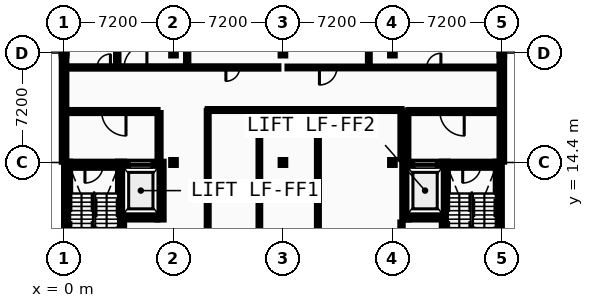
"""IFC4 building model, lengths in metres.
Left out: names, types, materials, properties, quantities, classifications, styles, units other than length and angle.
Written with IfcOpenShell. Run it as: python <this file> out.ifc"""

import sys

from ifc_helpers import new_model, si_unit, direction, frame, frame_2d, origin, origin_2d, place, context, subcontext, project, spatial, rectangle, i_section, extrude, element, fill, save


model = new_model("IFC4")
c1 = context("Model", 3, precision=1e-05, world=origin(), true_north=direction((0.0, 1.0)))
c2 = subcontext(c1, "Body", "Model", "MODEL_VIEW")
j1 = project(units=[si_unit("LENGTHUNIT", "METRE"), si_unit("PLANEANGLEUNIT", "RADIAN")], contexts=[c1])
p1 = place(None, origin())
s1 = spatial("IfcSite", under=j1, at=p1, CompositionType="ELEMENT")
p2 = place(p1, origin())
s2 = spatial("IfcBuilding", under=s1, at=p2, CompositionType="ELEMENT")
p3 = place(p2, frame((0.0, 0.0, 22.8)))
s3 = spatial("IfcBuildingStorey", under=s2, at=p3, CompositionType="ELEMENT", Elevation=22.8)
for number, where, z_axis, x_axis in (
    (1, (0.0, 21.6, 0.0), (0.0, 0.0, 1.0), (1.0, 0.0, 0.0)),
    (2, (7.2, 14.4, 0.0), (0.0, 0.0, 1.0), (1.0, 0.0, 0.0)),
    (3, (7.2, 21.6, 0.0), (0.0, 0.0, 1.0), (1.0, 0.0, 0.0)),
    (4, (14.4, 14.4, 0.0), (0.0, 0.0, 1.0), (1.0, 0.0, 0.0)),
    (5, (14.4, 21.6, 0.0), (0.0, 0.0, 1.0), (1.0, 0.0, 0.0)),
    (6, (21.6, 14.4, 0.0), (0.0, 0.0, 1.0), (1.0, 0.0, 0.0)),
    (7, (21.6, 21.6, 0.0), (0.0, 0.0, 1.0), (1.0, 0.0, 0.0)),
    (8, (28.8, 21.6, 0.0), (0.0, 0.0, 1.0), (1.0, 0.0, 0.0)),
):
    element("IfcColumn", number, at=place(p3, frame(where, z_axis=z_axis, x_axis=x_axis)), inside=s3, PredefinedType="COLUMN", context=c2, shape_type="SweptSolid", body=[
        extrude(i_section(OverallWidth=0.3, OverallDepth=0.32, WebThickness=0.011, FlangeThickness=0.021, FilletRadius=0.027, at=origin_2d()), origin(), (0.0, 0.0, 1.0), 4.4),
    ])
p4 = place(p3, frame((0.0, 21.6, 0.0), z_axis=(0.0, 0.0, 1.0), x_axis=(0.0, -1.0, 0.0)))
e9 = element("IfcWall", 9, at=p4, inside=s3, PredefinedType="STANDARD", context=c2, shape_type="SweptSolid", body=[
    extrude(rectangle(XDim=7.15, YDim=0.3, at=frame_2d((3.575, 0.0))), origin(), (0.0, 0.0, 1.0), 4.215),
])
p5 = place(p3, frame((0.0, 28.8, 0.0), z_axis=(0.0, 0.0, 1.0), x_axis=(0.0, -1.0, 0.0)))
e10 = element("IfcWall", 10, at=p5, inside=s3, PredefinedType="STANDARD", context=c2, shape_type="SweptSolid", body=[
    extrude(rectangle(XDim=7.2, YDim=0.3, at=frame_2d((3.6, 0.0))), origin(), (0.0, 0.0, 1.0), 3.9),
])
p6 = place(p5, frame((1.56, 0.0, 0.9)))
e11 = element("IfcOpeningElement", 11, at=p6, cuts=e10, PredefinedType="OPENING", context=c2, shape_type="SweptSolid", body=[
    extrude(rectangle(XDim=1.2, YDim=1.8, at=frame_2d((0.6, 0.9))), frame((0.0, 0.16, 0.0), z_axis=(0.0, -1.0, 0.0), x_axis=(1.0, 0.0, 0.0)), (0.0, 0.0, 1.0), 0.32),
])
p7 = place(p5, frame((4.44, 0.0, 0.9)))
e12 = element("IfcOpeningElement", 12, at=p7, cuts=e10, PredefinedType="OPENING", context=c2, shape_type="SweptSolid", body=[
    extrude(rectangle(XDim=1.2, YDim=1.8, at=frame_2d((0.6, 0.9))), frame((0.0, 0.16, 0.0), z_axis=(0.0, -1.0, 0.0), x_axis=(1.0, 0.0, 0.0)), (0.0, 0.0, 1.0), 0.32),
])
p8 = place(p3, frame((28.8, 14.45, 0.0), z_axis=(0.0, 0.0, 1.0), x_axis=(0.0, 1.0, 0.0)))
e13 = element("IfcWall", 13, at=p8, inside=s3, PredefinedType="STANDARD", context=c2, shape_type="SweptSolid", body=[
    extrude(rectangle(XDim=7.15, YDim=0.3, at=frame_2d((3.575, 0.0))), origin(), (0.0, 0.0, 1.0), 4.215),
])
p9 = place(p3, frame((0.4, 14.25, 0.0), z_axis=(0.0, 0.0, 1.0), x_axis=(1.0, 0.0, 0.0)))
e14 = element("IfcWall", 14, at=p9, inside=s3, PredefinedType="SHEAR", context=c2, shape_type="SweptSolid", body=[
    extrude(rectangle(XDim=3.15, YDim=0.4, at=frame_2d((1.575, 0.0))), origin(), (0.0, 0.0, 1.0), 4.215),
])
p10 = place(p9, frame((0.975, 0.0, 0.0)))
e15 = element("IfcOpeningElement", 15, at=p10, cuts=e14, PredefinedType="OPENING", context=c2, shape_type="SweptSolid", body=[
    extrude(rectangle(XDim=1.2, YDim=2.15, at=frame_2d((0.6, 1.075))), frame((0.0, 0.21, 0.0), z_axis=(0.0, -1.0, 0.0), x_axis=(1.0, 0.0, 0.0)), (0.0, 0.0, 1.0), 0.42),
])
for number, where, z_axis, x_axis in (
    (16, (0.2, 5.85, 0.0), (0.0, 0.0, 1.0), (0.0, 1.0, 0.0)),
    (17, (3.75, 5.85, 0.0), (0.0, 0.0, 1.0), (0.0, 1.0, 0.0)),
):
    element("IfcWall", number, at=place(p3, frame(where, z_axis=z_axis, x_axis=x_axis)), inside=s3, PredefinedType="SHEAR", context=c2, shape_type="SweptSolid", body=[
        extrude(rectangle(XDim=8.6, YDim=0.4, at=frame_2d((4.3, 0.0))), origin(), (0.0, 0.0, 1.0), 4.215),
    ])
p11 = place(p3, frame((3.95, 10.85, 0.0), z_axis=(0.0, 0.0, 1.0), x_axis=(1.0, 0.0, 0.0)))
e18 = element("IfcWall", 18, at=p11, inside=s3, PredefinedType="SHEAR", context=c2, shape_type="SweptSolid", body=[
    extrude(rectangle(XDim=2.2, YDim=0.4, at=frame_2d((1.1, 0.0))), origin(), (0.0, 0.0, 1.0), 4.215),
])
p12 = place(p3, frame((3.95, 14.25, 0.0), z_axis=(0.0, 0.0, 1.0), x_axis=(1.0, 0.0, 0.0)))
e19 = element("IfcWall", 19, at=p12, inside=s3, PredefinedType="SHEAR", context=c2, shape_type="SweptSolid", body=[
    extrude(rectangle(XDim=2.2, YDim=0.4, at=frame_2d((1.1, 0.0))), origin(), (0.0, 0.0, 1.0), 4.215),
])
p13 = place(p12, frame((0.4, 0.0, 0.0)))
e20 = element("IfcOpeningElement", 20, at=p13, cuts=e19, PredefinedType="OPENING", context=c2, shape_type="SweptSolid", body=[
    extrude(rectangle(XDim=1.4, YDim=2.2, at=frame_2d((0.7, 1.1))), frame((0.0, 0.21, 0.0), z_axis=(0.0, -1.0, 0.0), x_axis=(1.0, 0.0, 0.0)), (0.0, 0.0, 1.0), 0.42),
])
p14 = place(p3, frame((6.35, 10.65, 0.0), z_axis=(0.0, 0.0, 1.0), x_axis=(0.0, 1.0, 0.0)))
e21 = element("IfcWall", 21, at=p14, inside=s3, PredefinedType="SHEAR", context=c2, shape_type="SweptSolid", body=[
    extrude(rectangle(XDim=3.8, YDim=0.4, at=frame_2d((1.9, 0.0))), origin(), (0.0, 0.0, 1.0), 4.215),
])
p15 = place(p3, frame((0.4, 17.75, 0.0), z_axis=(0.0, 0.0, 1.0), x_axis=(1.0, 0.0, 0.0)))
e22 = element("IfcWall", 22, at=p15, inside=s3, PredefinedType="PARTITIONING", context=c2, shape_type="SweptSolid", body=[
    extrude(rectangle(XDim=5.75, YDim=0.2, at=frame_2d((2.875, 0.0))), origin(), (0.0, 0.0, 1.0), 4.215),
])
p16 = place(p15, frame((2.075, 0.0, 0.0)))
e23 = element("IfcOpeningElement", 23, at=p16, cuts=e22, PredefinedType="OPENING", context=c2, shape_type="SweptSolid", body=[
    extrude(rectangle(XDim=1.6, YDim=2.2, at=frame_2d((0.8, 1.1))), frame((0.0, 0.11, 0.0), z_axis=(0.0, -1.0, 0.0), x_axis=(1.0, 0.0, 0.0)), (0.0, 0.0, 1.0), 0.22),
])
p17 = place(p3, frame((6.25, 14.45, 0.0), z_axis=(0.0, 0.0, 1.0), x_axis=(0.0, 1.0, 0.0)))
e24 = element("IfcWall", 24, at=p17, inside=s3, PredefinedType="PARTITIONING", context=c2, shape_type="SweptSolid", body=[
    extrude(rectangle(XDim=3.2, YDim=0.2, at=frame_2d((1.6, 0.0))), origin(), (0.0, 0.0, 1.0), 4.215),
])
p18 = place(p3, frame((25.25, 14.25, 0.0), z_axis=(0.0, 0.0, 1.0), x_axis=(1.0, 0.0, 0.0)))
e25 = element("IfcWall", 25, at=p18, inside=s3, PredefinedType="SHEAR", context=c2, shape_type="SweptSolid", body=[
    extrude(rectangle(XDim=3.15, YDim=0.4, at=frame_2d((1.575, 0.0))), origin(), (0.0, 0.0, 1.0), 4.215),
])
p19 = place(p18, frame((0.975, 0.0, 0.0)))
e26 = element("IfcOpeningElement", 26, at=p19, cuts=e25, PredefinedType="OPENING", context=c2, shape_type="SweptSolid", body=[
    extrude(rectangle(XDim=1.2, YDim=2.15, at=frame_2d((0.6, 1.075))), frame((0.0, 0.21, 0.0), z_axis=(0.0, -1.0, 0.0), x_axis=(1.0, 0.0, 0.0)), (0.0, 0.0, 1.0), 0.42),
])
for number, where, z_axis, x_axis in (
    (27, (25.05, 5.85, 0.0), (0.0, 0.0, 1.0), (0.0, 1.0, 0.0)),
    (28, (28.6, 5.85, 0.0), (0.0, 0.0, 1.0), (0.0, 1.0, 0.0)),
):
    element("IfcWall", number, at=place(p3, frame(where, z_axis=z_axis, x_axis=x_axis)), inside=s3, PredefinedType="SHEAR", context=c2, shape_type="SweptSolid", body=[
        extrude(rectangle(XDim=8.6, YDim=0.4, at=frame_2d((4.3, 0.0))), origin(), (0.0, 0.0, 1.0), 4.215),
    ])
p20 = place(p3, frame((22.65, 10.85, 0.0), z_axis=(0.0, 0.0, 1.0), x_axis=(1.0, 0.0, 0.0)))
e29 = element("IfcWall", 29, at=p20, inside=s3, PredefinedType="SHEAR", context=c2, shape_type="SweptSolid", body=[
    extrude(rectangle(XDim=2.2, YDim=0.4, at=frame_2d((1.1, 0.0))), origin(), (0.0, 0.0, 1.0), 4.215),
])
p21 = place(p3, frame((22.65, 14.25, 0.0), z_axis=(0.0, 0.0, 1.0), x_axis=(1.0, 0.0, 0.0)))
e30 = element("IfcWall", 30, at=p21, inside=s3, PredefinedType="SHEAR", context=c2, shape_type="SweptSolid", body=[
    extrude(rectangle(XDim=2.2, YDim=0.4, at=frame_2d((1.1, 0.0))), origin(), (0.0, 0.0, 1.0), 4.215),
])
p22 = place(p21, frame((0.4, 0.0, 0.0)))
e31 = element("IfcOpeningElement", 31, at=p22, cuts=e30, PredefinedType="OPENING", context=c2, shape_type="SweptSolid", body=[
    extrude(rectangle(XDim=1.4, YDim=2.2, at=frame_2d((0.7, 1.1))), frame((0.0, 0.21, 0.0), z_axis=(0.0, -1.0, 0.0), x_axis=(1.0, 0.0, 0.0)), (0.0, 0.0, 1.0), 0.42),
])
p23 = place(p3, frame((22.45, 10.65, 0.0), z_axis=(0.0, 0.0, 1.0), x_axis=(0.0, 1.0, 0.0)))
e32 = element("IfcWall", 32, at=p23, inside=s3, PredefinedType="SHEAR", context=c2, shape_type="SweptSolid", body=[
    extrude(rectangle(XDim=3.8, YDim=0.4, at=frame_2d((1.9, 0.0))), origin(), (0.0, 0.0, 1.0), 4.215),
])
p24 = place(p3, frame((22.65, 17.75, 0.0), z_axis=(0.0, 0.0, 1.0), x_axis=(1.0, 0.0, 0.0)))
e33 = element("IfcWall", 33, at=p24, inside=s3, PredefinedType="PARTITIONING", context=c2, shape_type="SweptSolid", body=[
    extrude(rectangle(XDim=5.75, YDim=0.2, at=frame_2d((2.875, 0.0))), origin(), (0.0, 0.0, 1.0), 4.215),
])
p25 = place(p24, frame((2.075, 0.0, 0.0)))
e34 = element("IfcOpeningElement", 34, at=p25, cuts=e33, PredefinedType="OPENING", context=c2, shape_type="SweptSolid", body=[
    extrude(rectangle(XDim=1.6, YDim=2.2, at=frame_2d((0.8, 1.1))), frame((0.0, 0.11, 0.0), z_axis=(0.0, -1.0, 0.0), x_axis=(1.0, 0.0, 0.0)), (0.0, 0.0, 1.0), 0.22),
])
p26 = place(p3, frame((22.55, 14.45, 0.0), z_axis=(0.0, 0.0, 1.0), x_axis=(0.0, 1.0, 0.0)))
e35 = element("IfcWall", 35, at=p26, inside=s3, PredefinedType="PARTITIONING", context=c2, shape_type="SweptSolid", body=[
    extrude(rectangle(XDim=3.2, YDim=0.2, at=frame_2d((1.6, 0.0))), origin(), (0.0, 0.0, 1.0), 4.215),
])
p27 = place(p3, frame((9.45, 17.85, 0.0), z_axis=(0.0, 0.0, 1.0), x_axis=(1.0, 0.0, 0.0)))
e36 = element("IfcWall", 36, at=p27, inside=s3, PredefinedType="PARTITIONING", context=c2, shape_type="SweptSolid", body=[
    extrude(rectangle(XDim=12.75, YDim=0.125, at=frame_2d((6.375, 0.0))), origin(), (0.0, 0.0, 1.0), 4.215),
])
p28 = place(p27, frame((1.2, 0.0, 0.0)))
e37 = element("IfcOpeningElement", 37, at=p28, cuts=e36, PredefinedType="OPENING", context=c2, shape_type="SweptSolid", body=[
    extrude(rectangle(XDim=1.0, YDim=2.1, at=frame_2d((0.5, 1.05))), frame((0.0, 0.073, 0.0), z_axis=(0.0, -1.0, 0.0), x_axis=(1.0, 0.0, 0.0)), (0.0, 0.0, 1.0), 0.145),
])
p29 = place(p27, frame((5.9, 0.0, 0.0)))
e38 = element("IfcOpeningElement", 38, at=p29, cuts=e36, PredefinedType="OPENING", context=c2, shape_type="SweptSolid", body=[
    extrude(rectangle(XDim=0.9, YDim=2.1, at=frame_2d((0.45, 1.05))), frame((0.0, 0.073, 0.0), z_axis=(0.0, -1.0, 0.0), x_axis=(1.0, 0.0, 0.0)), (0.0, 0.0, 1.0), 0.145),
])
p30 = place(p27, frame((7.7, 0.0, 0.0)))
e39 = element("IfcOpeningElement", 39, at=p30, cuts=e36, PredefinedType="OPENING", context=c2, shape_type="SweptSolid", body=[
    extrude(rectangle(XDim=1.5, YDim=2.2, at=frame_2d((0.75, 1.1))), frame((0.0, 0.073, 0.0), z_axis=(0.0, -1.0, 0.0), x_axis=(1.0, 0.0, 0.0)), (0.0, 0.0, 1.0), 0.145),
])
p31 = place(p3, frame((0.2, 20.65, 0.0), z_axis=(0.0, 0.0, 1.0), x_axis=(1.0, 0.0, 0.0)))
e40 = element("IfcWall", 40, at=p31, inside=s3, PredefinedType="PARTITIONING", context=c2, shape_type="SweptSolid", body=[
    extrude(rectangle(XDim=13.9, YDim=0.15, at=frame_2d((6.95, 0.0))), origin(), (0.0, 0.0, 1.0), 4.215),
])
p32 = place(p31, frame((1.97, 0.0, 0.0)))
e41 = element("IfcOpeningElement", 41, at=p32, cuts=e40, PredefinedType="OPENING", context=c2, shape_type="SweptSolid", body=[
    extrude(rectangle(XDim=0.88, YDim=2.096, at=frame_2d((0.44, 1.048))), frame((0.0, 0.085, 0.0), z_axis=(0.0, -1.0, 0.0), x_axis=(1.0, 0.0, 0.0)), (0.0, 0.0, 1.0), 0.17),
])
p33 = place(p31, frame((3.75, 0.0, 0.0)))
e42 = element("IfcOpeningElement", 42, at=p33, cuts=e40, PredefinedType="OPENING", context=c2, shape_type="SweptSolid", body=[
    extrude(rectangle(XDim=1.5, YDim=2.2, at=frame_2d((0.75, 1.1))), frame((0.0, 0.085, 0.0), z_axis=(0.0, -1.0, 0.0), x_axis=(1.0, 0.0, 0.0)), (0.0, 0.0, 1.0), 0.17),
])
p34 = place(p31, frame((10.447, 0.0, 0.0)))
e43 = element("IfcOpeningElement", 43, at=p34, cuts=e40, PredefinedType="OPENING", context=c2, shape_type="SweptSolid", body=[
    extrude(rectangle(XDim=0.906, YDim=2.096, at=frame_2d((0.453, 1.048))), frame((0.0, 0.085, 0.0), z_axis=(0.0, -1.0, 0.0), x_axis=(1.0, 0.0, 0.0)), (0.0, 0.0, 1.0), 0.17),
])
p35 = place(p3, frame((14.7, 20.65, 0.0), z_axis=(0.0, 0.0, 1.0), x_axis=(1.0, 0.0, 0.0)))
e44 = element("IfcWall", 44, at=p35, inside=s3, PredefinedType="PARTITIONING", context=c2, shape_type="SweptSolid", body=[
    extrude(rectangle(XDim=13.9, YDim=0.118, at=frame_2d((6.95, 0.0))), origin(), (0.0, 0.0, 1.0), 4.215),
])
p36 = place(p35, frame((2.1, 0.0, 0.0)))
e45 = element("IfcOpeningElement", 45, at=p36, cuts=e44, PredefinedType="OPENING", context=c2, shape_type="SweptSolid", body=[
    extrude(rectangle(XDim=1.15, YDim=2.15, at=frame_2d((0.575, 1.075))), frame((0.0, 0.069, 0.0), z_axis=(0.0, -1.0, 0.0), x_axis=(1.0, 0.0, 0.0)), (0.0, 0.0, 1.0), 0.138),
])
p37 = place(p35, frame((9.159, 0.0, 0.0)))
e46 = element("IfcOpeningElement", 46, at=p37, cuts=e44, PredefinedType="OPENING", context=c2, shape_type="SweptSolid", body=[
    extrude(rectangle(XDim=0.932, YDim=2.096, at=frame_2d((0.466, 1.048))), frame((0.0, 0.069, 0.0), z_axis=(0.0, -1.0, 0.0), x_axis=(1.0, 0.0, 0.0)), (0.0, 0.0, 1.0), 0.138),
])
p38 = place(p3, frame((3.5, 20.725, 0.0), z_axis=(0.0, 0.0, 1.0), x_axis=(0.0, 1.0, 0.0)))
e47 = element("IfcWall", 47, at=p38, inside=s3, PredefinedType="PARTITIONING", context=c2, shape_type="SweptSolid", body=[
    extrude(rectangle(XDim=22.275, YDim=0.16, at=frame_2d((11.137, 0.0))), origin(), (0.0, 0.0, 1.0), 4.215),
])
p39 = place(p3, frame((8.1, 20.725, 0.0), z_axis=(0.0, 0.0, 1.0), x_axis=(0.0, 1.0, 0.0)))
e48 = element("IfcWall", 48, at=p39, inside=s3, PredefinedType="PARTITIONING", context=c2, shape_type="SweptSolid", body=[
    extrude(rectangle(XDim=22.195, YDim=0.15, at=frame_2d((11.097, 0.0))), origin(), (0.0, 0.0, 1.0), 4.215),
])
p40 = place(p3, frame((9.45, 3.36, 0.0), z_axis=(0.0, 0.0, 1.0), x_axis=(0.0, 1.0, 0.0)))
e49 = element("IfcWall", 49, at=p40, inside=s3, PredefinedType="PARTITIONING", context=c2, shape_type="SweptSolid", body=[
    extrude(rectangle(XDim=14.427, YDim=0.125, at=frame_2d((7.214, 0.0))), origin(), (0.0, 0.0, 1.0), 4.0),
])
p41 = place(p3, frame((12.85, 0.2, 0.0), z_axis=(0.0, 0.0, 1.0), x_axis=(0.0, 1.0, 0.0)))
e50 = element("IfcWall", 50, at=p41, inside=s3, PredefinedType="PARTITIONING", context=c2, shape_type="SweptSolid", body=[
    extrude(rectangle(XDim=17.588, YDim=0.11, at=frame_2d((8.794, 0.0))), origin(), (0.0, 0.0, 1.0), 4.215),
])
p42 = place(p3, frame((16.7, 0.2, 0.0), z_axis=(0.0, 0.0, 1.0), x_axis=(0.0, 1.0, 0.0)))
e51 = element("IfcWall", 51, at=p42, inside=s3, PredefinedType="PARTITIONING", context=c2, shape_type="SweptSolid", body=[
    extrude(rectangle(XDim=17.588, YDim=0.125, at=frame_2d((8.794, 0.0))), origin(), (0.0, 0.0, 1.0), 4.0),
])
p43 = place(p3, frame((20.05, 20.709, 0.0), z_axis=(0.0, 0.0, 1.0), x_axis=(0.0, 1.0, 0.0)))
e52 = element("IfcWall", 52, at=p43, inside=s3, PredefinedType="PARTITIONING", context=c2, shape_type="SweptSolid", body=[
    extrude(rectangle(XDim=22.232, YDim=0.118, at=frame_2d((11.116, 0.0))), origin(), (0.0, 0.0, 1.0), 4.215),
])
p44 = place(p3, frame((22.2, 0.2, 0.0), z_axis=(0.0, 0.0, 1.0), x_axis=(0.0, 1.0, 0.0)))
e53 = element("IfcWall", 53, at=p44, inside=s3, PredefinedType="PARTITIONING", context=c2, shape_type="SweptSolid", body=[
    extrude(rectangle(XDim=10.25, YDim=0.15, at=frame_2d((5.125, 0.0))), origin(), (0.0, 0.0, 1.0), 4.215),
])
p45 = place(p3, frame((22.2, 14.65, 0.0), z_axis=(0.0, 0.0, 1.0), x_axis=(0.0, 1.0, 0.0)))
e54 = element("IfcWall", 54, at=p45, inside=s3, PredefinedType="PARTITIONING", context=c2, shape_type="SweptSolid", body=[
    extrude(rectangle(XDim=3.138, YDim=0.142, at=frame_2d((1.569, 0.0))), origin(), (0.0, 0.0, 1.0), 4.215),
])
p46 = place(p10, frame((1.2, 0.0, 0.0), z_axis=(0.0, 0.0, 1.0), x_axis=(-1.0, 0.0, 0.0)))
e55 = element("IfcDoor", 55, at=p46, inside=s3, OperationType="SINGLE_SWING_LEFT", PredefinedType="DOOR", context=c2, shape_type="SweptSolid", body=[
    extrude(rectangle(XDim=1.2, YDim=2.15, at=frame_2d((0.6, 1.075))), frame((0.0, 0.025, 0.0), z_axis=(0.0, -1.0, 0.0), x_axis=(1.0, 0.0, 0.0)), (0.0, 0.0, 1.0), 0.05),
])
fill(e15, e55)
p47 = place(p13, origin())
e56 = element("IfcDoor", 56, at=p47, inside=s3, OperationType="SLIDING_TO_LEFT", PredefinedType="DOOR", context=c2, shape_type="SweptSolid", body=[
    extrude(rectangle(XDim=1.4, YDim=2.2, at=frame_2d((0.7, 1.1))), frame((0.0, 0.025, 0.0), z_axis=(0.0, -1.0, 0.0), x_axis=(1.0, 0.0, 0.0)), (0.0, 0.0, 1.0), 0.05),
])
fill(e20, e56)
p48 = place(p16, origin())
e57 = element("IfcDoor", 57, at=p48, inside=s3, OperationType="DOUBLE_DOOR_SINGLE_SWING", PredefinedType="DOOR", context=c2, shape_type="SweptSolid", body=[
    extrude(rectangle(XDim=1.6, YDim=2.2, at=frame_2d((0.8, 1.1))), frame((0.0, 0.025, 0.0), z_axis=(0.0, -1.0, 0.0), x_axis=(1.0, 0.0, 0.0)), (0.0, 0.0, 1.0), 0.05),
])
fill(e23, e57)
p49 = place(p19, frame((1.2, 0.0, 0.0), z_axis=(0.0, 0.0, 1.0), x_axis=(-1.0, 0.0, 0.0)))
e58 = element("IfcDoor", 58, at=p49, inside=s3, OperationType="SINGLE_SWING_LEFT", PredefinedType="DOOR", context=c2, shape_type="SweptSolid", body=[
    extrude(rectangle(XDim=1.2, YDim=2.15, at=frame_2d((0.6, 1.075))), frame((0.0, 0.025, 0.0), z_axis=(0.0, -1.0, 0.0), x_axis=(1.0, 0.0, 0.0)), (0.0, 0.0, 1.0), 0.05),
])
fill(e26, e58)
p50 = place(p22, origin())
e59 = element("IfcDoor", 59, at=p50, inside=s3, OperationType="SLIDING_TO_LEFT", PredefinedType="DOOR", context=c2, shape_type="SweptSolid", body=[
    extrude(rectangle(XDim=1.4, YDim=2.2, at=frame_2d((0.7, 1.1))), frame((0.0, 0.025, 0.0), z_axis=(0.0, -1.0, 0.0), x_axis=(1.0, 0.0, 0.0)), (0.0, 0.0, 1.0), 0.05),
])
fill(e31, e59)
p51 = place(p25, origin())
e60 = element("IfcDoor", 60, at=p51, inside=s3, OperationType="DOUBLE_DOOR_SINGLE_SWING", PredefinedType="DOOR", context=c2, shape_type="SweptSolid", body=[
    extrude(rectangle(XDim=1.6, YDim=2.2, at=frame_2d((0.8, 1.1))), frame((0.0, 0.025, 0.0), z_axis=(0.0, -1.0, 0.0), x_axis=(1.0, 0.0, 0.0)), (0.0, 0.0, 1.0), 0.05),
])
fill(e34, e60)
p52 = place(p28, origin())
e61 = element("IfcDoor", 61, at=p52, inside=s3, OperationType="SLIDING_TO_LEFT", PredefinedType="DOOR", context=c2, shape_type="SweptSolid", body=[
    extrude(rectangle(XDim=1.0, YDim=2.1, at=frame_2d((0.5, 1.05))), frame((0.0, 0.025, 0.0), z_axis=(0.0, -1.0, 0.0), x_axis=(1.0, 0.0, 0.0)), (0.0, 0.0, 1.0), 0.05),
])
fill(e37, e61)
p53 = place(p29, origin())
e62 = element("IfcDoor", 62, at=p53, inside=s3, OperationType="SINGLE_SWING_RIGHT", PredefinedType="DOOR", context=c2, shape_type="SweptSolid", body=[
    extrude(rectangle(XDim=0.9, YDim=2.1, at=frame_2d((0.45, 1.05))), frame((0.0, 0.025, 0.0), z_axis=(0.0, -1.0, 0.0), x_axis=(1.0, 0.0, 0.0)), (0.0, 0.0, 1.0), 0.05),
])
fill(e38, e62)
p54 = place(p32, frame((0.88, 0.0, 0.0), z_axis=(0.0, 0.0, 1.0), x_axis=(-1.0, 0.0, 0.0)))
e63 = element("IfcDoor", 63, at=p54, inside=s3, OperationType="SINGLE_SWING_RIGHT", PredefinedType="DOOR", context=c2, shape_type="SweptSolid", body=[
    extrude(rectangle(XDim=0.88, YDim=2.096, at=frame_2d((0.44, 1.048))), frame((0.0, 0.025, 0.0), z_axis=(0.0, -1.0, 0.0), x_axis=(1.0, 0.0, 0.0)), (0.0, 0.0, 1.0), 0.05),
])
fill(e41, e63)
p55 = place(p30, origin())
e64 = element("IfcDoor", 64, at=p55, inside=s3, OperationType="DOUBLE_DOOR_SINGLE_SWING", PredefinedType="DOOR", context=c2, shape_type="SweptSolid", body=[
    extrude(rectangle(XDim=1.5, YDim=2.2, at=frame_2d((0.75, 1.1))), frame((0.0, 0.025, 0.0), z_axis=(0.0, -1.0, 0.0), x_axis=(1.0, 0.0, 0.0)), (0.0, 0.0, 1.0), 0.05),
])
fill(e39, e64)
p56 = place(p33, frame((1.5, 0.0, 0.0), z_axis=(0.0, 0.0, 1.0), x_axis=(-1.0, 0.0, 0.0)))
e65 = element("IfcDoor", 65, at=p56, inside=s3, OperationType="DOUBLE_DOOR_SINGLE_SWING", PredefinedType="DOOR", context=c2, shape_type="SweptSolid", body=[
    extrude(rectangle(XDim=1.5, YDim=2.2, at=frame_2d((0.75, 1.1))), frame((0.0, 0.025, 0.0), z_axis=(0.0, -1.0, 0.0), x_axis=(1.0, 0.0, 0.0)), (0.0, 0.0, 1.0), 0.05),
])
fill(e42, e65)
p57 = place(p36, frame((1.15, 0.0, 0.0), z_axis=(0.0, 0.0, 1.0), x_axis=(-1.0, 0.0, 0.0)))
e66 = element("IfcDoor", 66, at=p57, inside=s3, OperationType="SINGLE_SWING_LEFT", PredefinedType="DOOR", context=c2, shape_type="SweptSolid", body=[
    extrude(rectangle(XDim=1.15, YDim=2.15, at=frame_2d((0.575, 1.075))), frame((0.0, 0.025, 0.0), z_axis=(0.0, -1.0, 0.0), x_axis=(1.0, 0.0, 0.0)), (0.0, 0.0, 1.0), 0.05),
])
fill(e45, e66)
p58 = place(p34, frame((0.906, 0.0, 0.0), z_axis=(0.0, 0.0, 1.0), x_axis=(-1.0, 0.0, 0.0)))
e67 = element("IfcDoor", 67, at=p58, inside=s3, OperationType="SINGLE_SWING_LEFT", PredefinedType="DOOR", context=c2, shape_type="SweptSolid", body=[
    extrude(rectangle(XDim=0.906, YDim=2.096, at=frame_2d((0.453, 1.048))), frame((0.0, 0.025, 0.0), z_axis=(0.0, -1.0, 0.0), x_axis=(1.0, 0.0, 0.0)), (0.0, 0.0, 1.0), 0.05),
])
fill(e43, e67)
p59 = place(p37, frame((0.932, 0.0, 0.0), z_axis=(0.0, 0.0, 1.0), x_axis=(-1.0, 0.0, 0.0)))
e68 = element("IfcDoor", 68, at=p59, inside=s3, OperationType="SINGLE_SWING_RIGHT", PredefinedType="DOOR", context=c2, shape_type="SweptSolid", body=[
    extrude(rectangle(XDim=0.932, YDim=2.096, at=frame_2d((0.466, 1.048))), frame((0.0, 0.025, 0.0), z_axis=(0.0, -1.0, 0.0), x_axis=(1.0, 0.0, 0.0)), (0.0, 0.0, 1.0), 0.05),
])
fill(e46, e68)
save(model, sys.argv[1])
